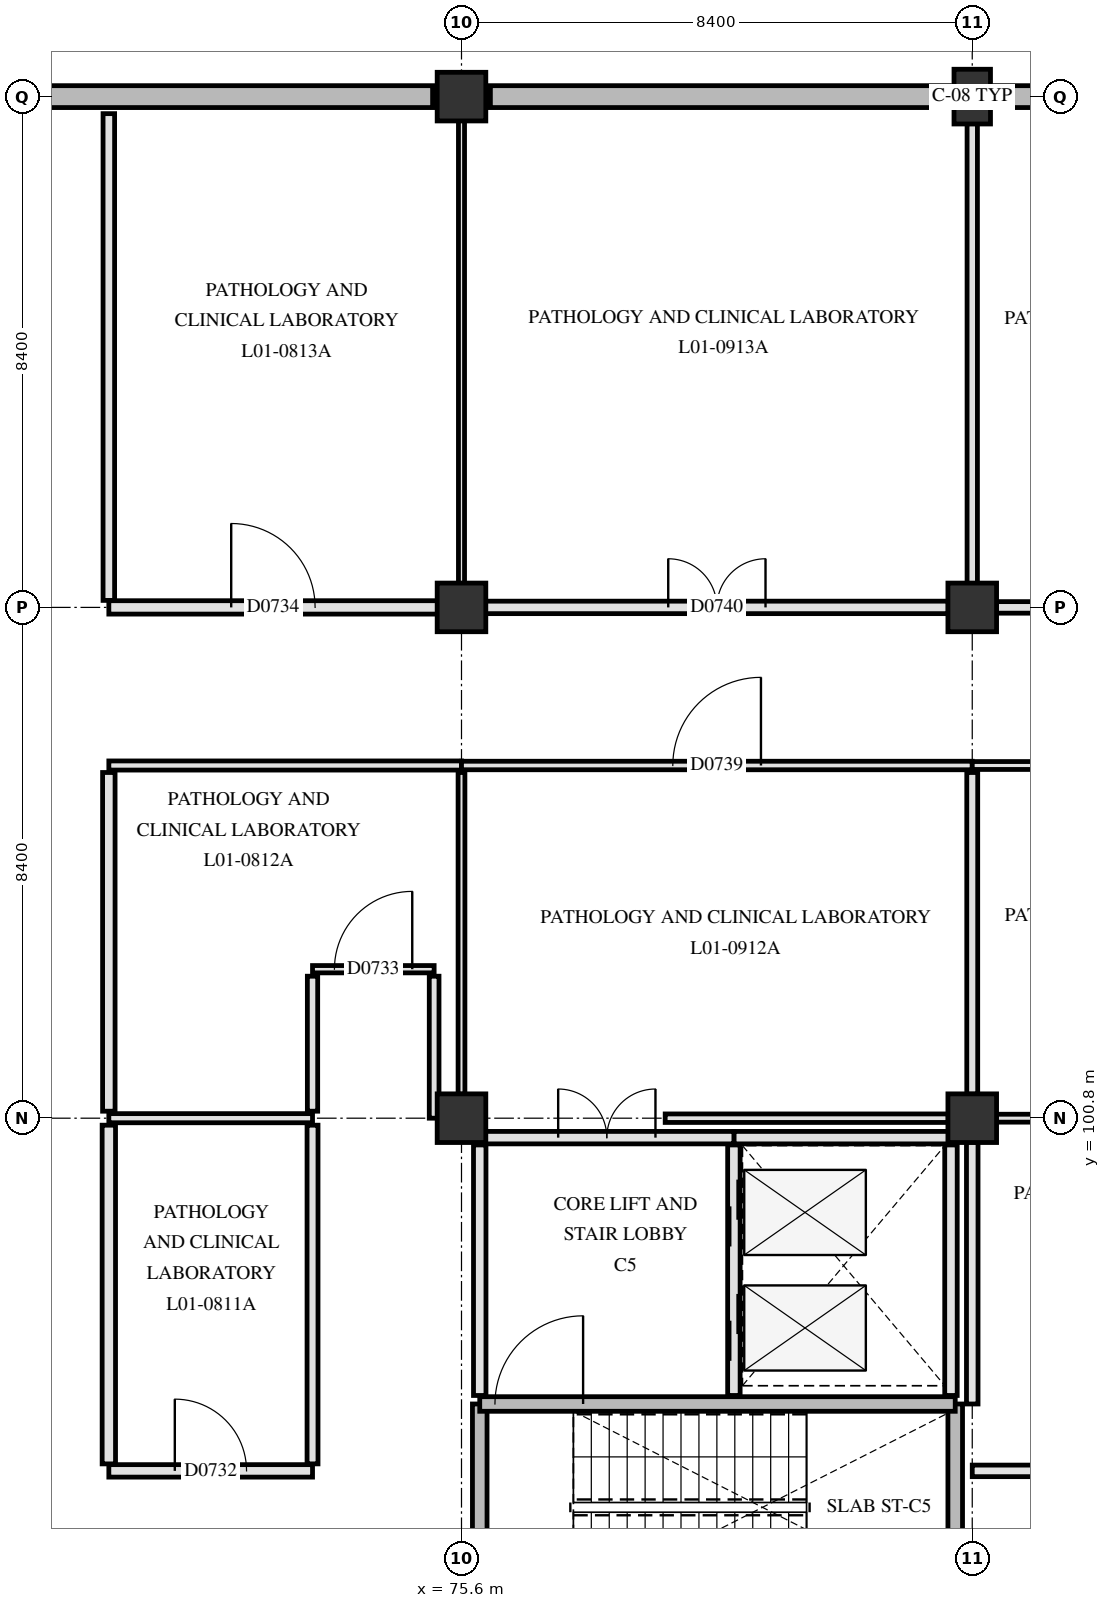
"""IFC4 building model, lengths in metres.
Left out: names, types, materials, properties, quantities, classifications, styles, units other than length and angle.
Written with IfcOpenShell. Run it as: python <this file> out.ifc"""

import sys

from ifc_helpers import new_model, si_unit, direction, frame, frame_2d, origin, origin_2d, place, context, subcontext, project, spatial, rectangle, extrude, element, fill, save


model = new_model("IFC4")
c1 = context("Model", 3, precision=1e-05, world=origin(), true_north=direction((0.0, 1.0)))
c2 = subcontext(c1, "Body", "Model", "MODEL_VIEW")
j1 = project(units=[si_unit("LENGTHUNIT", "METRE"), si_unit("PLANEANGLEUNIT", "RADIAN")], contexts=[c1])
p1 = place(None, origin())
s1 = spatial("IfcSite", under=j1, at=p1, CompositionType="ELEMENT")
p2 = place(p1, origin())
s2 = spatial("IfcBuilding", under=s1, at=p2, CompositionType="ELEMENT")
p3 = place(p2, frame((0.0, 0.0, 4.8)))
s3 = spatial("IfcBuildingStorey", under=s2, at=p3, CompositionType="ELEMENT", Elevation=4.8)
for number, where, z_axis, x_axis in (
    (1, (75.6, 100.8, 0.0), (0.0, 0.0, 1.0), (1.0, 0.0, 0.0)),
    (2, (75.6, 109.2, 0.0), (0.0, 0.0, 1.0), (1.0, 0.0, 0.0)),
    (3, (75.6, 117.6, 0.0), (0.0, 0.0, 1.0), (1.0, 0.0, 0.0)),
    (4, (84.0, 100.8, 0.0), (0.0, 0.0, 1.0), (1.0, 0.0, 0.0)),
    (5, (84.0, 109.2, 0.0), (0.0, 0.0, 1.0), (1.0, 0.0, 0.0)),
):
    element("IfcColumn", number, at=place(p3, frame(where, z_axis=z_axis, x_axis=x_axis)), inside=s3, PredefinedType="COLUMN", context=c2, shape_type="SweptSolid", body=[
        extrude(rectangle(XDim=0.8, YDim=0.8, at=origin_2d()), origin(), (0.0, 0.0, 1.0), 4.5),
    ])
p4 = place(p3, frame((84.0, 117.6, 0.0), z_axis=(0.0, 0.0, 1.0), x_axis=(1.0, 0.0, 0.0)))
e6 = element("IfcColumn", 6, at=p4, inside=s3, PredefinedType="PILASTER", context=c2, shape_type="SweptSolid", body=[
    extrude(rectangle(XDim=0.6, YDim=0.9, at=origin_2d()), origin(), (0.0, 0.0, 1.0), 4.5),
])
p5 = place(p3, frame((67.675, 117.6, 0.0), z_axis=(0.0, 0.0, 1.0), x_axis=(1.0, 0.0, 0.0)))
e7 = element("IfcWall", 7, at=p5, inside=s3, PredefinedType="SOLIDWALL", context=c2, shape_type="SweptSolid", body=[
    extrude(rectangle(XDim=7.45, YDim=0.36, at=frame_2d((3.725, 0.0))), origin(), (0.0, 0.0, 1.0), 4.15),
])
for number, where, z_axis, x_axis in (
    (8, (76.075, 117.6, 0.0), (0.0, 0.0, 1.0), (1.0, 0.0, 0.0)),
    (9, (84.375, 117.6, 0.0), (0.0, 0.0, 1.0), (1.0, 0.0, 0.0)),
):
    element("IfcWall", number, at=place(p3, frame(where, z_axis=z_axis, x_axis=x_axis)), inside=s3, PredefinedType="SOLIDWALL", context=c2, shape_type="SweptSolid", body=[
        extrude(rectangle(XDim=7.55, YDim=0.36, at=frame_2d((3.775, 0.0))), origin(), (0.0, 0.0, 1.0), 4.15),
    ])
for number, where, z_axis, x_axis in (
    (10, (75.9, 92.78, 0.0), (0.0, 0.0, 1.0), (0.0, 1.0, 0.0)),
    (11, (83.72, 92.78, 0.0), (0.0, 0.0, 1.0), (0.0, 1.0, 0.0)),
):
    element("IfcWall", number, at=place(p3, frame(where, z_axis=z_axis, x_axis=x_axis)), inside=s3, PredefinedType="SHEAR", context=c2, shape_type="SweptSolid", body=[
        extrude(rectangle(XDim=3.32, YDim=0.24, at=frame_2d((1.66, 0.0))), origin(), (0.0, 0.0, 1.0), 4.15),
    ])
p6 = place(p3, frame((75.9, 96.1, 0.0), z_axis=(0.0, 0.0, 1.0), x_axis=(1.0, 0.0, 0.0)))
e12 = element("IfcWall", 12, at=p6, inside=s3, PredefinedType="SHEAR", context=c2, shape_type="SweptSolid", body=[
    extrude(rectangle(XDim=7.82, YDim=0.24, at=frame_2d((3.91, 0.0))), origin(), (0.0, 0.0, 1.0), 4.15),
])
p7 = place(p6, frame((0.25, 0.0, 0.0)))
e13 = element("IfcOpeningElement", 13, at=p7, cuts=e12, PredefinedType="OPENING", context=c2, shape_type="SweptSolid", body=[
    extrude(rectangle(XDim=1.45, YDim=2.2, at=frame_2d((0.725, 1.1))), frame((0.0, 0.13, 0.0), z_axis=(0.0, -1.0, 0.0), x_axis=(1.0, 0.0, 0.0)), (0.0, 0.0, 1.0), 0.26),
])
p8 = place(p3, frame((80.08, 96.24, 0.0), z_axis=(0.0, 0.0, 1.0), x_axis=(0.0, 1.0, 0.0)))
e14 = element("IfcWall", 14, at=p8, inside=s3, PredefinedType="PARTITIONING", context=c2, shape_type="SweptSolid", body=[
    extrude(rectangle(XDim=4.12, YDim=0.205, at=frame_2d((2.06, 0.0))), origin(), (0.0, 0.0, 1.0), 4.14),
])
p9 = place(p8, frame((0.57, 0.0, 0.0)))
e15 = element("IfcOpeningElement", 15, at=p9, cuts=e14, PredefinedType="OPENING", context=c2, shape_type="SweptSolid", body=[
    extrude(rectangle(XDim=1.1, YDim=2.15, at=frame_2d((0.55, 1.075))), frame((0.0, 0.113, 0.0), z_axis=(0.0, -1.0, 0.0), x_axis=(1.0, 0.0, 0.0)), (0.0, 0.0, 1.0), 0.225),
])
p10 = place(p8, frame((2.45, 0.0, 0.0)))
e16 = element("IfcOpeningElement", 16, at=p10, cuts=e14, PredefinedType="OPENING", context=c2, shape_type="SweptSolid", body=[
    extrude(rectangle(XDim=1.1, YDim=2.15, at=frame_2d((0.55, 1.075))), frame((0.0, 0.113, 0.0), z_axis=(0.0, -1.0, 0.0), x_axis=(1.0, 0.0, 0.0)), (0.0, 0.0, 1.0), 0.225),
])
p11 = place(p3, frame((83.65, 96.24, 0.0), z_axis=(0.0, 0.0, 1.0), x_axis=(0.0, 1.0, 0.0)))
e17 = element("IfcWall", 17, at=p11, inside=s3, PredefinedType="PARTITIONING", context=c2, shape_type="SweptSolid", body=[
    extrude(rectangle(XDim=4.12, YDim=0.205, at=frame_2d((2.06, 0.0))), origin(), (0.0, 0.0, 1.0), 4.14),
])
p12 = place(p3, frame((80.08, 100.48, 0.0), z_axis=(0.0, 0.0, 1.0), x_axis=(1.0, 0.0, 0.0)))
e18 = element("IfcWall", 18, at=p12, inside=s3, PredefinedType="PARTITIONING", context=c2, shape_type="SweptSolid", body=[
    extrude(rectangle(XDim=3.57, YDim=0.205, at=frame_2d((1.785, 0.0))), origin(), (0.0, 0.0, 1.0), 3.54),
])
p13 = place(p3, frame((75.9, 96.24, 0.0), z_axis=(0.0, 0.0, 1.0), x_axis=(0.0, 1.0, 0.0)))
e19 = element("IfcWall", 19, at=p13, inside=s3, PredefinedType="PARTITIONING", context=c2, shape_type="SweptSolid", body=[
    extrude(rectangle(XDim=4.12, YDim=0.205, at=frame_2d((2.06, 0.0))), origin(), (0.0, 0.0, 1.0), 3.59),
])
p14 = place(p3, frame((75.9, 100.48, 0.0), z_axis=(0.0, 0.0, 1.0), x_axis=(1.0, 0.0, 0.0)))
e20 = element("IfcWall", 20, at=p14, inside=s3, PredefinedType="PARTITIONING", context=c2, shape_type="SweptSolid", body=[
    extrude(rectangle(XDim=4.18, YDim=0.205, at=frame_2d((2.09, 0.0))), origin(), (0.0, 0.0, 1.0), 3.54),
])
p15 = place(p14, frame((1.29, 0.0, 0.0)))
e21 = element("IfcOpeningElement", 21, at=p15, cuts=e20, PredefinedType="OPENING", context=c2, shape_type="SweptSolid", body=[
    extrude(rectangle(XDim=1.6, YDim=2.25, at=frame_2d((0.8, 1.125))), frame((0.0, 0.113, 0.0), z_axis=(0.0, -1.0, 0.0), x_axis=(1.0, 0.0, 0.0)), (0.0, 0.0, 1.0), 0.225),
])
p16 = place(p3, frame((69.8, 95.0, 0.0), z_axis=(0.0, 0.0, 1.0), x_axis=(1.0, 0.0, 0.0)))
e22 = element("IfcWall", 22, at=p16, inside=s3, PredefinedType="PARTITIONING", context=c2, shape_type="SweptSolid", body=[
    extrude(rectangle(XDim=3.35, YDim=0.205, at=frame_2d((1.675, 0.0))), origin(), (0.0, 0.0, 1.0), 4.14),
])
p17 = place(p16, frame((1.085, 0.0, 0.0)))
e23 = element("IfcOpeningElement", 23, at=p17, cuts=e22, PredefinedType="OPENING", context=c2, shape_type="SweptSolid", body=[
    extrude(rectangle(XDim=1.18, YDim=2.18, at=frame_2d((0.59, 1.09))), frame((0.0, 0.113, 0.0), z_axis=(0.0, -1.0, 0.0), x_axis=(1.0, 0.0, 0.0)), (0.0, 0.0, 1.0), 0.225),
])
p18 = place(p3, frame((84.0, 95.0, 0.0), z_axis=(0.0, 0.0, 1.0), x_axis=(1.0, 0.0, 0.0)))
e24 = element("IfcWall", 24, at=p18, inside=s3, PredefinedType="PARTITIONING", context=c2, shape_type="SweptSolid", body=[
    extrude(rectangle(XDim=8.4, YDim=0.19, at=frame_2d((4.2, 0.0))), origin(), (0.0, 0.0, 1.0), 3.59),
])
p19 = place(p18, frame((3.675, 0.0, 0.0)))
e25 = element("IfcOpeningElement", 25, at=p19, cuts=e24, PredefinedType="OPENING", context=c2, shape_type="SweptSolid", body=[
    extrude(rectangle(XDim=1.05, YDim=2.15, at=frame_2d((0.525, 1.075))), frame((0.0, 0.105, 0.0), z_axis=(0.0, -1.0, 0.0), x_axis=(1.0, 0.0, 0.0)), (0.0, 0.0, 1.0), 0.21),
])
p20 = place(p3, frame((69.8, 100.8, 0.0), z_axis=(0.0, 0.0, 1.0), x_axis=(1.0, 0.0, 0.0)))
e26 = element("IfcWall", 26, at=p20, inside=s3, PredefinedType="PARTITIONING", context=c2, shape_type="SweptSolid", body=[
    extrude(rectangle(XDim=3.35, YDim=0.15, at=frame_2d((1.675, 0.0))), origin(), (0.0, 0.0, 1.0), 3.54),
])
p21 = place(p3, frame((78.95, 100.8, 0.0), z_axis=(0.0, 0.0, 1.0), x_axis=(1.0, 0.0, 0.0)))
e27 = element("IfcWall", 27, at=p21, inside=s3, PredefinedType="PARTITIONING", context=c2, shape_type="SweptSolid", body=[
    extrude(rectangle(XDim=4.655, YDim=0.14, at=frame_2d((2.328, 0.0))), origin(), (0.0, 0.0, 1.0), 3.54),
])
p22 = place(p3, frame((84.395, 100.8, 0.0), z_axis=(0.0, 0.0, 1.0), x_axis=(1.0, 0.0, 0.0)))
e28 = element("IfcWall", 28, at=p22, inside=s3, PredefinedType="PARTITIONING", context=c2, shape_type="SweptSolid", body=[
    extrude(rectangle(XDim=7.61, YDim=0.13, at=frame_2d((3.805, 0.0))), origin(), (0.0, 0.0, 1.0), 3.54),
])
p23 = place(p3, frame((73.15, 103.25, 0.0), z_axis=(0.0, 0.0, 1.0), x_axis=(1.0, 0.0, 0.0)))
e29 = element("IfcWall", 29, at=p23, inside=s3, PredefinedType="PARTITIONING", context=c2, shape_type="SweptSolid", body=[
    extrude(rectangle(XDim=2.0, YDim=0.12, at=frame_2d((1.0, 0.0))), origin(), (0.0, 0.0, 1.0), 4.14),
])
p24 = place(p23, frame((0.36, 0.0, 0.0)))
e30 = element("IfcOpeningElement", 30, at=p24, cuts=e29, PredefinedType="OPENING", context=c2, shape_type="SweptSolid", body=[
    extrude(rectangle(XDim=1.28, YDim=2.18, at=frame_2d((0.64, 1.09))), frame((0.0, 0.07, 0.0), z_axis=(0.0, -1.0, 0.0), x_axis=(1.0, 0.0, 0.0)), (0.0, 0.0, 1.0), 0.14),
])
p25 = place(p3, frame((69.8, 106.6, 0.0), z_axis=(0.0, 0.0, 1.0), x_axis=(1.0, 0.0, 0.0)))
e31 = element("IfcWall", 31, at=p25, inside=s3, PredefinedType="PARTITIONING", context=c2, shape_type="SweptSolid", body=[
    extrude(rectangle(XDim=5.8, YDim=0.15, at=frame_2d((2.9, 0.0))), origin(), (0.0, 0.0, 1.0), 3.59),
])
p26 = place(p3, frame((75.6, 106.6, 0.0), z_axis=(0.0, 0.0, 1.0), x_axis=(1.0, 0.0, 0.0)))
e32 = element("IfcWall", 32, at=p26, inside=s3, PredefinedType="PARTITIONING", context=c2, shape_type="SweptSolid", body=[
    extrude(rectangle(XDim=8.4, YDim=0.14, at=frame_2d((4.2, 0.0))), origin(), (0.0, 0.0, 1.0), 3.59),
])
p27 = place(p26, frame((3.475, 0.0, 0.0)))
e33 = element("IfcOpeningElement", 33, at=p27, cuts=e32, PredefinedType="OPENING", context=c2, shape_type="SweptSolid", body=[
    extrude(rectangle(XDim=1.45, YDim=2.2, at=frame_2d((0.725, 1.1))), frame((0.0, 0.08, 0.0), z_axis=(0.0, -1.0, 0.0), x_axis=(1.0, 0.0, 0.0)), (0.0, 0.0, 1.0), 0.16),
])
p28 = place(p3, frame((84.0, 106.6, 0.0), z_axis=(0.0, 0.0, 1.0), x_axis=(1.0, 0.0, 0.0)))
e34 = element("IfcWall", 34, at=p28, inside=s3, PredefinedType="PARTITIONING", context=c2, shape_type="SweptSolid", body=[
    extrude(rectangle(XDim=8.4, YDim=0.13, at=frame_2d((4.2, 0.0))), origin(), (0.0, 0.0, 1.0), 3.59),
])
p29 = place(p28, frame((3.725, 0.0, 0.0)))
e35 = element("IfcOpeningElement", 35, at=p29, cuts=e34, PredefinedType="OPENING", context=c2, shape_type="SweptSolid", body=[
    extrude(rectangle(XDim=0.95, YDim=2.1, at=frame_2d((0.475, 1.05))), frame((0.0, 0.075, 0.0), z_axis=(0.0, -1.0, 0.0), x_axis=(1.0, 0.0, 0.0)), (0.0, 0.0, 1.0), 0.15),
])
p30 = place(p3, frame((69.8, 109.2, 0.0), z_axis=(0.0, 0.0, 1.0), x_axis=(1.0, 0.0, 0.0)))
e36 = element("IfcWall", 36, at=p30, inside=s3, PredefinedType="PARTITIONING", context=c2, shape_type="SweptSolid", body=[
    extrude(rectangle(XDim=5.405, YDim=0.22, at=frame_2d((2.703, 0.0))), origin(), (0.0, 0.0, 1.0), 3.54),
])
p31 = place(p30, frame((2.012, 0.0, 0.0)))
e37 = element("IfcOpeningElement", 37, at=p31, cuts=e36, PredefinedType="OPENING", context=c2, shape_type="SweptSolid", body=[
    extrude(rectangle(XDim=1.38, YDim=2.22, at=frame_2d((0.69, 1.11))), frame((0.0, 0.12, 0.0), z_axis=(0.0, -1.0, 0.0), x_axis=(1.0, 0.0, 0.0)), (0.0, 0.0, 1.0), 0.24),
])
p32 = place(p3, frame((75.995, 109.2, 0.0), z_axis=(0.0, 0.0, 1.0), x_axis=(1.0, 0.0, 0.0)))
e38 = element("IfcWall", 38, at=p32, inside=s3, PredefinedType="PARTITIONING", context=c2, shape_type="SweptSolid", body=[
    extrude(rectangle(XDim=7.61, YDim=0.205, at=frame_2d((3.805, 0.0))), origin(), (0.0, 0.0, 1.0), 3.54),
])
p33 = place(p32, frame((3.005, 0.0, 0.0)))
e39 = element("IfcOpeningElement", 39, at=p33, cuts=e38, PredefinedType="OPENING", context=c2, shape_type="SweptSolid", body=[
    extrude(rectangle(XDim=1.6, YDim=2.25, at=frame_2d((0.8, 1.125))), frame((0.0, 0.113, 0.0), z_axis=(0.0, -1.0, 0.0), x_axis=(1.0, 0.0, 0.0)), (0.0, 0.0, 1.0), 0.225),
])
p34 = place(p3, frame((84.395, 109.2, 0.0), z_axis=(0.0, 0.0, 1.0), x_axis=(1.0, 0.0, 0.0)))
e40 = element("IfcWall", 40, at=p34, inside=s3, PredefinedType="PARTITIONING", context=c2, shape_type="SweptSolid", body=[
    extrude(rectangle(XDim=7.61, YDim=0.19, at=frame_2d((3.805, 0.0))), origin(), (0.0, 0.0, 1.0), 3.54),
])
p35 = place(p34, frame((3.255, 0.0, 0.0)))
e41 = element("IfcOpeningElement", 41, at=p35, cuts=e40, PredefinedType="OPENING", context=c2, shape_type="SweptSolid", body=[
    extrude(rectangle(XDim=1.1, YDim=2.15, at=frame_2d((0.55, 1.075))), frame((0.0, 0.105, 0.0), z_axis=(0.0, -1.0, 0.0), x_axis=(1.0, 0.0, 0.0)), (0.0, 0.0, 1.0), 0.21),
])
p36 = place(p3, frame((69.8, 95.115, 0.0), z_axis=(0.0, 0.0, 1.0), x_axis=(0.0, 1.0, 0.0)))
e42 = element("IfcWall", 42, at=p36, inside=s3, PredefinedType="PARTITIONING", context=c2, shape_type="SweptSolid", body=[
    extrude(rectangle(XDim=5.57, YDim=0.22, at=frame_2d((2.785, 0.0))), origin(), (0.0, 0.0, 1.0), 3.54),
])
p37 = place(p3, frame((69.8, 100.915, 0.0), z_axis=(0.0, 0.0, 1.0), x_axis=(0.0, 1.0, 0.0)))
e43 = element("IfcWall", 43, at=p37, inside=s3, PredefinedType="PARTITIONING", context=c2, shape_type="SweptSolid", body=[
    extrude(rectangle(XDim=5.57, YDim=0.205, at=frame_2d((2.785, 0.0))), origin(), (0.0, 0.0, 1.0), 3.54),
])
p38 = place(p3, frame((69.8, 109.315, 0.0), z_axis=(0.0, 0.0, 1.0), x_axis=(0.0, 1.0, 0.0)))
e44 = element("IfcWall", 44, at=p38, inside=s3, PredefinedType="PARTITIONING", context=c2, shape_type="SweptSolid", body=[
    extrude(rectangle(XDim=8.005, YDim=0.19, at=frame_2d((4.002, 0.0))), origin(), (0.0, 0.0, 1.0), 3.54),
])
p39 = place(p3, frame((73.15, 95.115, 0.0), z_axis=(0.0, 0.0, 1.0), x_axis=(0.0, 1.0, 0.0)))
e45 = element("IfcWall", 45, at=p39, inside=s3, PredefinedType="PARTITIONING", context=c2, shape_type="SweptSolid", body=[
    extrude(rectangle(XDim=5.57, YDim=0.18, at=frame_2d((2.785, 0.0))), origin(), (0.0, 0.0, 1.0), 3.54),
])
p40 = place(p3, frame((73.15, 100.915, 0.0), z_axis=(0.0, 0.0, 1.0), x_axis=(0.0, 1.0, 0.0)))
e46 = element("IfcWall", 46, at=p40, inside=s3, PredefinedType="PARTITIONING", context=c2, shape_type="SweptSolid", body=[
    extrude(rectangle(XDim=2.22, YDim=0.17, at=frame_2d((1.11, 0.0))), origin(), (0.0, 0.0, 1.0), 3.54),
])
p41 = place(p3, frame((75.15, 100.8, 0.0), z_axis=(0.0, 0.0, 1.0), x_axis=(0.0, 1.0, 0.0)))
e47 = element("IfcWall", 47, at=p41, inside=s3, PredefinedType="PARTITIONING", context=c2, shape_type="SweptSolid", body=[
    extrude(rectangle(XDim=2.335, YDim=0.16, at=frame_2d((1.167, 0.0))), origin(), (0.0, 0.0, 1.0), 3.54),
])
p42 = place(p3, frame((75.6, 101.195, 0.0), z_axis=(0.0, 0.0, 1.0), x_axis=(0.0, 1.0, 0.0)))
e48 = element("IfcWall", 48, at=p42, inside=s3, PredefinedType="PARTITIONING", context=c2, shape_type="SweptSolid", body=[
    extrude(rectangle(XDim=5.29, YDim=0.112, at=frame_2d((2.645, 0.0))), origin(), (0.0, 0.0, 1.0), 3.59),
])
p43 = place(p3, frame((75.6, 109.595, 0.0), z_axis=(0.0, 0.0, 1.0), x_axis=(0.0, 1.0, 0.0)))
e49 = element("IfcWall", 49, at=p43, inside=s3, PredefinedType="PARTITIONING", context=c2, shape_type="SweptSolid", body=[
    extrude(rectangle(XDim=7.61, YDim=0.1, at=frame_2d((3.805, 0.0))), origin(), (0.0, 0.0, 1.0), 3.59),
])
p44 = place(p3, frame((84.0, 96.1, 0.0), z_axis=(0.0, 0.0, 1.0), x_axis=(0.0, 1.0, 0.0)))
e50 = element("IfcWall", 50, at=p44, inside=s3, PredefinedType="PARTITIONING", context=c2, shape_type="SweptSolid", body=[
    extrude(rectangle(XDim=4.305, YDim=0.19, at=frame_2d((2.152, 0.0))), origin(), (0.0, 0.0, 1.0), 3.59),
])
p45 = place(p3, frame((84.0, 101.195, 0.0), z_axis=(0.0, 0.0, 1.0), x_axis=(0.0, 1.0, 0.0)))
e51 = element("IfcWall", 51, at=p45, inside=s3, PredefinedType="PARTITIONING", context=c2, shape_type="SweptSolid", body=[
    extrude(rectangle(XDim=5.29, YDim=0.18, at=frame_2d((2.645, 0.0))), origin(), (0.0, 0.0, 1.0), 3.59),
])
p46 = place(p3, frame((84.0, 109.595, 0.0), z_axis=(0.0, 0.0, 1.0), x_axis=(0.0, 1.0, 0.0)))
e52 = element("IfcWall", 52, at=p46, inside=s3, PredefinedType="PARTITIONING", context=c2, shape_type="SweptSolid", body=[
    extrude(rectangle(XDim=7.56, YDim=0.17, at=frame_2d((3.78, 0.0))), origin(), (0.0, 0.0, 1.0), 3.59),
])
p47 = place(p7, origin())
e53 = element("IfcDoor", 53, at=p47, inside=s3, OperationType="SINGLE_SWING_RIGHT", PredefinedType="DOOR", context=c2, shape_type="SweptSolid", body=[
    extrude(rectangle(XDim=1.45, YDim=2.2, at=frame_2d((0.725, 1.1))), frame((0.0, 0.025, 0.0), z_axis=(0.0, -1.0, 0.0), x_axis=(1.0, 0.0, 0.0)), (0.0, 0.0, 1.0), 0.05),
])
fill(e13, e53)
p48 = place(p9, origin())
e54 = element("IfcDoor", 54, at=p48, inside=s3, OperationType="SLIDING_TO_LEFT", PredefinedType="DOOR", context=c2, shape_type="SweptSolid", body=[
    extrude(rectangle(XDim=1.1, YDim=2.15, at=frame_2d((0.55, 1.075))), frame((0.0, 0.025, 0.0), z_axis=(0.0, -1.0, 0.0), x_axis=(1.0, 0.0, 0.0)), (0.0, 0.0, 1.0), 0.05),
])
fill(e15, e54)
p49 = place(p10, origin())
e55 = element("IfcDoor", 55, at=p49, inside=s3, OperationType="SLIDING_TO_LEFT", PredefinedType="DOOR", context=c2, shape_type="SweptSolid", body=[
    extrude(rectangle(XDim=1.1, YDim=2.15, at=frame_2d((0.55, 1.075))), frame((0.0, 0.025, 0.0), z_axis=(0.0, -1.0, 0.0), x_axis=(1.0, 0.0, 0.0)), (0.0, 0.0, 1.0), 0.05),
])
fill(e16, e55)
p50 = place(p15, origin())
e56 = element("IfcDoor", 56, at=p50, inside=s3, OperationType="DOUBLE_SWING_LEFT", PredefinedType="DOOR", context=c2, shape_type="SweptSolid", body=[
    extrude(rectangle(XDim=1.6, YDim=2.25, at=frame_2d((0.8, 1.125))), frame((0.0, 0.025, 0.0), z_axis=(0.0, -1.0, 0.0), x_axis=(1.0, 0.0, 0.0)), (0.0, 0.0, 1.0), 0.05),
])
fill(e21, e56)
p51 = place(p17, origin())
e57 = element("IfcDoor", 57, at=p51, inside=s3, OperationType="SINGLE_SWING_LEFT", PredefinedType="DOOR", context=c2, shape_type="SweptSolid", body=[
    extrude(rectangle(XDim=1.18, YDim=2.18, at=frame_2d((0.59, 1.09))), frame((0.0, 0.025, 0.0), z_axis=(0.0, -1.0, 0.0), x_axis=(1.0, 0.0, 0.0)), (0.0, 0.0, 1.0), 0.05),
])
fill(e23, e57)
p52 = place(p24, origin())
e58 = element("IfcDoor", 58, at=p52, inside=s3, OperationType="SINGLE_SWING_RIGHT", PredefinedType="DOOR", context=c2, shape_type="SweptSolid", body=[
    extrude(rectangle(XDim=1.28, YDim=2.18, at=frame_2d((0.64, 1.09))), frame((0.0, 0.025, 0.0), z_axis=(0.0, -1.0, 0.0), x_axis=(1.0, 0.0, 0.0)), (0.0, 0.0, 1.0), 0.05),
])
fill(e30, e58)
p53 = place(p31, origin())
e59 = element("IfcDoor", 59, at=p53, inside=s3, OperationType="SINGLE_SWING_LEFT", PredefinedType="DOOR", context=c2, shape_type="SweptSolid", body=[
    extrude(rectangle(XDim=1.38, YDim=2.22, at=frame_2d((0.69, 1.11))), frame((0.0, 0.025, 0.0), z_axis=(0.0, -1.0, 0.0), x_axis=(1.0, 0.0, 0.0)), (0.0, 0.0, 1.0), 0.05),
])
fill(e37, e59)
p54 = place(p27, origin())
e60 = element("IfcDoor", 60, at=p54, inside=s3, OperationType="SINGLE_SWING_RIGHT", PredefinedType="DOOR", context=c2, shape_type="SweptSolid", body=[
    extrude(rectangle(XDim=1.45, YDim=2.2, at=frame_2d((0.725, 1.1))), frame((0.0, 0.025, 0.0), z_axis=(0.0, -1.0, 0.0), x_axis=(1.0, 0.0, 0.0)), (0.0, 0.0, 1.0), 0.05),
])
fill(e33, e60)
p55 = place(p33, origin())
e61 = element("IfcDoor", 61, at=p55, inside=s3, OperationType="DOUBLE_SWING_LEFT", PredefinedType="DOOR", context=c2, shape_type="SweptSolid", body=[
    extrude(rectangle(XDim=1.6, YDim=2.25, at=frame_2d((0.8, 1.125))), frame((0.0, 0.025, 0.0), z_axis=(0.0, -1.0, 0.0), x_axis=(1.0, 0.0, 0.0)), (0.0, 0.0, 1.0), 0.05),
])
fill(e39, e61)
save(model, sys.argv[1])
